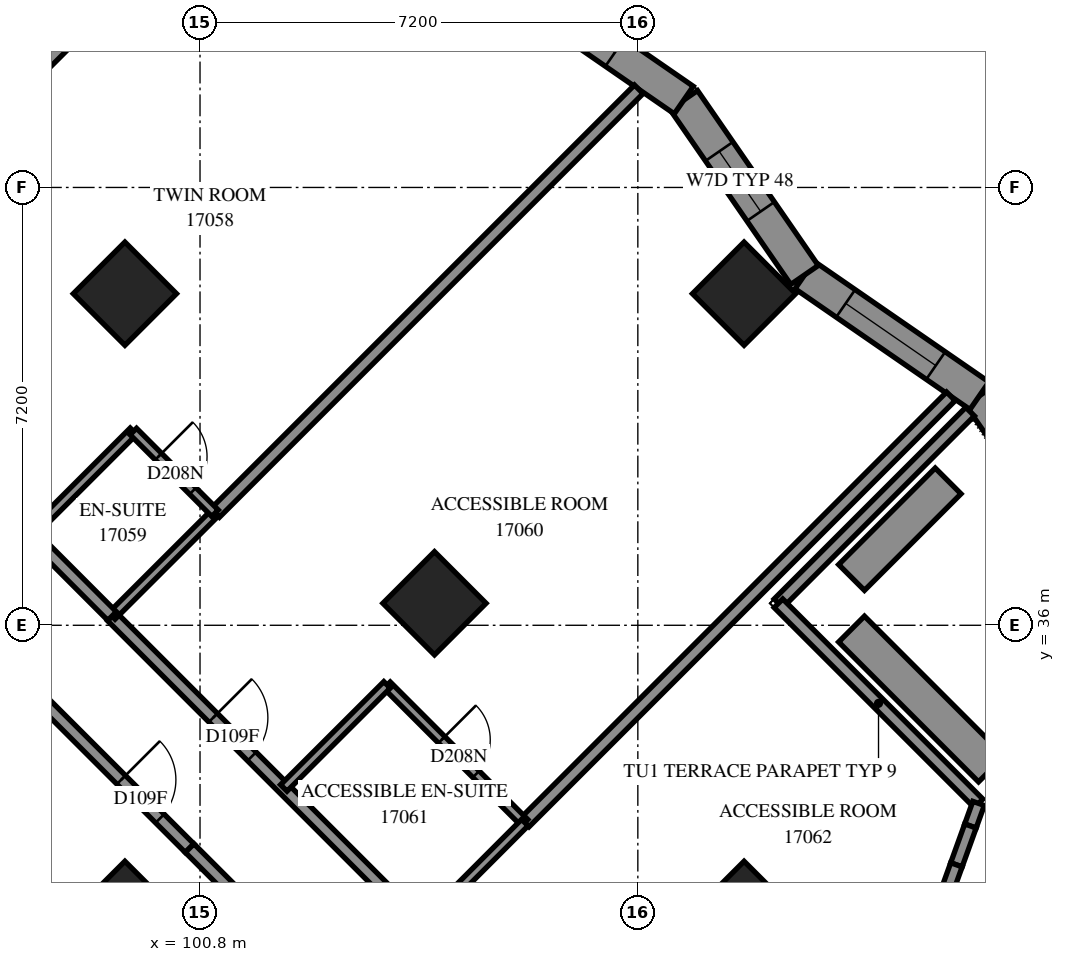
"""IFC4 building model, lengths in metres.
Left out: names, types, materials, properties, quantities, classifications, styles, units other than length and angle.
Written with IfcOpenShell. Run it as: python <this file> out.ifc"""

import sys

from ifc_helpers import new_model, si_unit, direction, frame, frame_2d, origin, origin_2d, place, context, subcontext, project, spatial, polyline, rectangle, outline, extrude, element, fill, save


model = new_model("IFC4")
c1 = context("Model", 3, precision=1e-05, world=origin(), true_north=direction((0.0, 1.0)))
c2 = subcontext(c1, "Body", "Model", "MODEL_VIEW")
j1 = project(units=[si_unit("LENGTHUNIT", "METRE"), si_unit("PLANEANGLEUNIT", "RADIAN")], contexts=[c1])
p1 = place(None, origin())
s1 = spatial("IfcSite", under=j1, at=p1, CompositionType="ELEMENT")
p2 = place(p1, origin())
s2 = spatial("IfcBuilding", under=s1, at=p2, CompositionType="ELEMENT")
p3 = place(p2, frame((0.0, 0.0, 64.4)))
s3 = spatial("IfcBuildingStorey", under=s2, at=p3, CompositionType="ELEMENT", Elevation=64.4)
for number, where, z_axis, x_axis in (
    (1, (99.565, 41.453, 0.0), (0.0, 0.0, 1.0), (0.707, -0.707, 0.0)),
    (2, (109.747, 41.453, 0.0), (0.0, 0.0, 1.0), (0.707, -0.707, 0.0)),
    (3, (104.656, 36.362, 0.0), (0.0, 0.0, 1.0), (0.707, -0.707, 0.0)),
    (4, (99.565, 31.271, 0.0), (0.0, 0.0, 1.0), (0.707, -0.707, 0.0)),
    (5, (109.747, 31.271, 0.0), (0.0, 0.0, 1.0), (0.707, -0.707, 0.0)),
):
    element("IfcColumn", number, at=place(p3, frame(where, z_axis=z_axis, x_axis=x_axis)), inside=s3, PredefinedType="COLUMN", context=c2, shape_type="SweptSolid", body=[
        extrude(rectangle(XDim=1.2, YDim=1.2, at=origin_2d()), origin(), (0.0, 0.0, 1.0), 3.1),
    ])
p4 = place(p3, frame((115.617, 36.879, 0.0), z_axis=(0.0, 0.0, 1.0), x_axis=(-0.5680848714, 0.8229699745, 0.0)))
e6 = element("IfcWall", 6, at=p4, inside=s3, PredefinedType="SOLIDWALL", context=c2, shape_type="SweptSolid", body=[
    extrude(outline(polyline([(0.074, -0.275), (3.569, -0.275), (3.469, 0.275), (-0.074, 0.275), (0.074, -0.275)])), origin(), (0.0, 0.0, 1.0), 3.1),
])
p5 = place(p4, frame((0.834, 0.0, 0.7)))
e7 = element("IfcOpeningElement", 7, at=p5, cuts=e6, PredefinedType="OPENING", context=c2, shape_type="SweptSolid", body=[
    extrude(rectangle(XDim=1.8, YDim=2.0, at=frame_2d((0.9, 1.0))), frame((0.0, 0.285, 0.0), z_axis=(0.0, -1.0, 0.0), x_axis=(1.0, 0.0, 0.0)), (0.0, 0.0, 1.0), 0.57),
])
p6 = place(p3, frame((113.618, 39.775, 0.0), z_axis=(0.0, 0.0, 1.0), x_axis=(-0.8229761943, 0.5680758609, 0.0)))
e8 = element("IfcWall", 8, at=p6, inside=s3, PredefinedType="SOLIDWALL", context=c2, shape_type="SweptSolid", body=[
    extrude(outline(polyline([(-0.05, -0.275), (3.445, -0.275), (3.546, 0.275), (0.05, 0.275), (-0.05, -0.275)])), origin(), (0.0, 0.0, 1.0), 3.1),
])
p7 = place(p6, frame((0.873, 0.0, 0.7)))
e9 = element("IfcOpeningElement", 9, at=p7, cuts=e8, PredefinedType="OPENING", context=c2, shape_type="SweptSolid", body=[
    extrude(rectangle(XDim=1.8, YDim=2.0, at=frame_2d((0.9, 1.0))), frame((0.0, 0.285, 0.0), z_axis=(0.0, -1.0, 0.0), x_axis=(1.0, 0.0, 0.0)), (0.0, 0.0, 1.0), 0.57),
])
p8 = place(p3, frame((110.741, 41.761, 0.0), z_axis=(0.0, 0.0, 1.0), x_axis=(-0.5680698592, 0.822980337, 0.0)))
e10 = element("IfcWall", 10, at=p8, inside=s3, PredefinedType="SOLIDWALL", context=c2, shape_type="SweptSolid", body=[
    extrude(outline(polyline([(0.05, -0.275), (3.546, -0.275), (3.445, 0.275), (-0.05, 0.275), (0.05, -0.275)])), origin(), (0.0, 0.0, 1.0), 3.1),
])
p9 = place(p8, frame((1.269, 0.0, 0.5)))
e11 = element("IfcOpeningElement", 11, at=p9, cuts=e10, PredefinedType="OPENING", context=c2, shape_type="SweptSolid", body=[
    extrude(rectangle(XDim=1.2, YDim=2.45, at=frame_2d((0.6, 1.225))), frame((0.0, 0.285, 0.0), z_axis=(0.0, -1.0, 0.0), x_axis=(1.0, 0.0, 0.0)), (0.0, 0.0, 1.0), 0.57),
])
p10 = place(p3, frame((108.755, 44.637, 0.0), z_axis=(0.0, 0.0, 1.0), x_axis=(-0.8229761943, 0.5680758609, 0.0)))
e12 = element("IfcWall", 12, at=p10, inside=s3, PredefinedType="SOLIDWALL", context=c2, shape_type="SweptSolid", body=[
    extrude(outline(polyline([(-0.05, -0.275), (3.445, -0.275), (3.546, 0.275), (0.05, 0.275), (-0.05, -0.275)])), origin(), (0.0, 0.0, 1.0), 3.1),
])
p11 = place(p10, frame((1.377, 0.0, 0.5)))
e13 = element("IfcOpeningElement", 13, at=p11, cuts=e12, PredefinedType="OPENING", context=c2, shape_type="SweptSolid", body=[
    extrude(rectangle(XDim=1.2, YDim=2.45, at=frame_2d((0.6, 1.225))), frame((0.0, 0.285, 0.0), z_axis=(0.0, -1.0, 0.0), x_axis=(1.0, 0.0, 0.0)), (0.0, 0.0, 1.0), 0.57),
])
p12 = place(p3, frame((113.464, 39.513, 0.0), z_axis=(0.0, 0.0, 1.0), x_axis=(-0.7071067812, -0.7071067812, 0.0)))
e14 = element("IfcWall", 14, at=p12, inside=s3, PredefinedType="PARAPET", context=c2, shape_type="SweptSolid", body=[
    extrude(outline(polyline([(0.0, -0.1), (4.557, -0.1), (4.357, 0.1), (0.0, 0.1), (0.0, -0.1)])), origin(), (0.0, 0.0, 1.0), 0.25),
])
p13 = place(p3, frame((110.313, 36.362, 0.0), z_axis=(0.0, 0.0, 1.0), x_axis=(0.7070960376, -0.7071175246, 0.0)))
e15 = element("IfcWall", 15, at=p13, inside=s3, PredefinedType="PARAPET", context=c2, shape_type="SweptSolid", body=[
    extrude(outline(polyline([(-0.1, -0.1), (4.59, -0.1), (4.718, 0.1), (0.1, 0.1), (-0.1, -0.1)])), origin(), (0.0, 0.0, 1.0), 0.25),
])
p14 = place(p3, frame((113.603, 33.071, 0.0), z_axis=(0.0, 0.0, 1.0), x_axis=(-0.3390781297, -0.9407582165, 0.0)))
e16 = element("IfcWall", 16, at=p14, inside=s3, PredefinedType="PARAPET", context=c2, shape_type="SweptSolid", body=[
    extrude(outline(polyline([(0.064, -0.1), (0.395, -0.1), (0.395, 0.1), (-0.064, 0.1), (0.064, -0.1)])), origin(), (0.0, 0.0, 1.0), 0.25),
])
p15 = place(p3, frame((113.47, 32.699, 0.0), z_axis=(0.0, 0.0, 1.0), x_axis=(-0.339246254, -0.9406976024, 0.0)))
e17 = element("IfcWall", 17, at=p15, inside=s3, PredefinedType="PARAPET", context=c2, shape_type="SweptSolid", body=[
    extrude(outline(polyline([(0.0, -0.1), (0.679, -0.1), (0.679, 0.1), (0.0, 0.1), (0.0, -0.1)])), origin(), (0.0, 0.0, 1.0), 0.25),
])
p16 = place(p3, frame((113.239, 32.061, 0.0), z_axis=(0.0, 0.0, 1.0), x_axis=(-0.3392575143, -0.9406935415, 0.0)))
e18 = element("IfcWall", 18, at=p16, inside=s3, PredefinedType="PARAPET", context=c2, shape_type="SweptSolid", body=[
    extrude(outline(polyline([(0.0, -0.1), (4.185, -0.1), (4.185, 0.1), (0.0, 0.1), (0.0, -0.1)])), origin(), (0.0, 0.0, 1.0), 0.25),
])
p17 = place(p3, frame((111.515, 35.938, 0.0), z_axis=(0.0, 0.0, 1.0), x_axis=(0.7070914108, -0.7071221512, 0.0)))
e19 = element("IfcWall", 19, at=p17, inside=s3, PredefinedType="SOLIDWALL", context=c2, shape_type="SweptSolid", body=[
    extrude(rectangle(XDim=3.253, YDim=0.6, at=frame_2d((1.627, 0.0))), origin(), (0.0, 0.0, 1.0), 0.65),
])
p18 = place(p3, frame((94.259, 41.243, 0.0), z_axis=(0.0, 0.0, 1.0), x_axis=(0.7070206559, 0.7071928959, 0.0)))
e20 = element("IfcWall", 20, at=p18, inside=s3, PredefinedType="PARTITIONING", context=c2, shape_type="SweptSolid", body=[
    extrude(rectangle(XDim=12.192, YDim=0.2, at=frame_2d((6.096, 0.0))), origin(), (0.0, 0.0, 1.0), 3.1),
])
p19 = place(p3, frame((93.484, 42.02, 0.0), z_axis=(0.0, 0.0, 1.0), x_axis=(0.7071067812, 0.7071067812, 0.0)))
e21 = element("IfcWall", 21, at=p19, inside=s3, PredefinedType="PARTITIONING", context=c2, shape_type="SweptSolid", body=[
    extrude(rectangle(XDim=9.998, YDim=0.2, at=frame_2d((4.999, 0.0))), origin(), (0.0, 0.0, 1.0), 3.1),
])
p20 = place(p19, frame((0.148, 0.0, 0.0)))
e22 = element("IfcOpeningElement", 22, at=p20, cuts=e21, PredefinedType="OPENING", context=c2, shape_type="SweptSolid", body=[
    extrude(rectangle(XDim=1.0, YDim=2.1, at=frame_2d((0.5, 1.05))), frame((0.0, 0.11, 0.0), z_axis=(0.0, -1.0, 0.0), x_axis=(1.0, 0.0, 0.0)), (0.0, 0.0, 1.0), 0.22),
])
p21 = place(p3, frame((106.14, 32.756, 0.0), z_axis=(0.0, 0.0, 1.0), x_axis=(0.7071017366, 0.7071118258, 0.0)))
e23 = element("IfcWall", 23, at=p21, inside=s3, PredefinedType="PARTITIONING", context=c2, shape_type="SweptSolid", body=[
    extrude(rectangle(XDim=9.912, YDim=0.2, at=frame_2d((4.956, 0.0))), origin(), (0.0, 0.0, 1.0), 3.1),
])
p22 = place(p3, frame((101.049, 37.847, 0.0), z_axis=(0.0, 0.0, 1.0), x_axis=(0.7071067812, 0.7071067812, 0.0)))
e24 = element("IfcWall", 24, at=p22, inside=s3, PredefinedType="PARTITIONING", context=c2, shape_type="SweptSolid", body=[
    extrude(rectangle(XDim=9.852, YDim=0.2, at=frame_2d((4.926, 0.0))), origin(), (0.0, 0.0, 1.0), 3.1),
])
p23 = place(p3, frame((99.349, 36.147, 0.0), z_axis=(0.0, 0.0, 1.0), x_axis=(0.7071067812, -0.7071067812, 0.0)))
e25 = element("IfcWall", 25, at=p23, inside=s3, PredefinedType="PARTITIONING", context=c2, shape_type="SweptSolid", body=[
    extrude(rectangle(XDim=7.201, YDim=0.2, at=frame_2d((3.601, 0.0))), origin(), (0.0, 0.0, 1.0), 3.1),
])
p24 = place(p23, frame((2.358, 0.0, 0.0)))
e26 = element("IfcOpeningElement", 26, at=p24, cuts=e25, PredefinedType="OPENING", context=c2, shape_type="SweptSolid", body=[
    extrude(rectangle(XDim=0.9, YDim=2.1, at=frame_2d((0.45, 1.05))), frame((0.0, 0.11, 0.0), z_axis=(0.0, -1.0, 0.0), x_axis=(1.0, 0.0, 0.0)), (0.0, 0.0, 1.0), 0.22),
])
p25 = place(p3, frame((98.082, 34.879, 0.0), z_axis=(0.0, 0.0, 1.0), x_axis=(0.7073845681, -0.7068288851, 0.0)))
e27 = element("IfcWall", 27, at=p25, inside=s3, PredefinedType="PARTITIONING", context=c2, shape_type="SweptSolid", body=[
    extrude(rectangle(XDim=3.599, YDim=0.2, at=frame_2d((1.8, 0.0))), origin(), (0.0, 0.0, 1.0), 3.1),
])
p26 = place(p25, frame((2.009, 0.0, 0.0)))
e28 = element("IfcOpeningElement", 28, at=p26, cuts=e27, PredefinedType="OPENING", context=c2, shape_type="SweptSolid", body=[
    extrude(rectangle(XDim=0.9, YDim=2.1, at=frame_2d((0.45, 1.05))), frame((0.0, 0.11, 0.0), z_axis=(0.0, -1.0, 0.0), x_axis=(1.0, 0.0, 0.0)), (0.0, 0.0, 1.0), 0.22),
])
p27 = place(p3, frame((103.875, 35.015, 0.0), z_axis=(0.0, 0.0, 1.0), x_axis=(0.7071067812, -0.7071067812, 0.0)))
e29 = element("IfcWall", 29, at=p27, inside=s3, PredefinedType="PARTITIONING", context=c2, shape_type="SweptSolid", body=[
    extrude(rectangle(XDim=3.199, YDim=0.15, at=frame_2d((1.599, 0.0))), origin(), (0.0, 0.0, 1.0), 3.1),
])
p28 = place(p27, frame((1.27, 0.0, 0.0)))
e30 = element("IfcOpeningElement", 30, at=p28, cuts=e29, PredefinedType="OPENING", context=c2, shape_type="SweptSolid", body=[
    extrude(rectangle(XDim=0.8, YDim=2.1, at=frame_2d((0.4, 1.05))), frame((0.0, 0.085, 0.0), z_axis=(0.0, -1.0, 0.0), x_axis=(1.0, 0.0, 0.0)), (0.0, 0.0, 1.0), 0.17),
])
for number, where, z_axis, x_axis in (
    (31, (99.349, 36.153, 0.0), (0.0, 0.0, 1.0), (0.708, 0.707, 0.0)),
    (32, (104.445, 31.057, 0.0), (0.0, 0.0, 1.0), (0.707, 0.708, 0.0)),
    (33, (102.177, 33.325, 0.0), (0.0, 0.0, 1.0), (0.708, 0.707, 0.0)),
):
    element("IfcWall", number, at=place(p3, frame(where, z_axis=z_axis, x_axis=x_axis)), inside=s3, PredefinedType="PARTITIONING", context=c2, shape_type="SweptSolid", body=[
        extrude(rectangle(XDim=2.4, YDim=0.15, at=frame_2d((1.2, 0.0))), origin(), (0.0, 0.0, 1.0), 3.1),
    ])
p29 = place(p3, frame((98.009, 37.495, 0.0), z_axis=(0.0, 0.0, 1.0), x_axis=(0.7071067812, 0.7071067812, 0.0)))
e34 = element("IfcWall", 34, at=p29, inside=s3, PredefinedType="PARTITIONING", context=c2, shape_type="SweptSolid", body=[
    extrude(rectangle(XDim=2.398, YDim=0.15, at=frame_2d((1.199, 0.0))), origin(), (0.0, 0.0, 1.0), 3.1),
])
p30 = place(p3, frame((99.703, 39.187, 0.0), z_axis=(0.0, 0.0, 1.0), x_axis=(0.7071067812, -0.7071067812, 0.0)))
e35 = element("IfcWall", 35, at=p30, inside=s3, PredefinedType="PARTITIONING", context=c2, shape_type="SweptSolid", body=[
    extrude(rectangle(XDim=1.901, YDim=0.15, at=frame_2d((0.95, 0.0))), origin(), (0.0, 0.0, 1.0), 3.1),
])
p31 = place(p30, frame((0.584, 0.0, 0.0)))
e36 = element("IfcOpeningElement", 36, at=p31, cuts=e35, PredefinedType="OPENING", context=c2, shape_type="SweptSolid", body=[
    extrude(rectangle(XDim=0.8, YDim=2.1, at=frame_2d((0.4, 1.05))), frame((0.0, 0.085, 0.0), z_axis=(0.0, -1.0, 0.0), x_axis=(1.0, 0.0, 0.0)), (0.0, 0.0, 1.0), 0.17),
])
p32 = place(p3, frame((98.012, 37.496, 0.0), z_axis=(0.0, 0.0, 1.0), x_axis=(0.7065800724, -0.7076330979, 0.0)))
e37 = element("IfcWall", 37, at=p32, inside=s3, PredefinedType="PARTITIONING", context=c2, shape_type="SweptSolid", body=[
    extrude(rectangle(XDim=1.899, YDim=0.2, at=frame_2d((0.95, 0.0))), origin(), (0.0, 0.0, 1.0), 3.1),
])
p33 = place(p3, frame((100.629, 32.335, 0.0), z_axis=(0.0, 0.0, 1.0), x_axis=(0.7071067812, -0.7071067812, 0.0)))
e38 = element("IfcWall", 38, at=p33, inside=s3, PredefinedType="PARTITIONING", context=c2, shape_type="SweptSolid", body=[
    extrude(rectangle(XDim=1.7, YDim=0.2, at=frame_2d((0.85, 0.0))), origin(), (0.0, 0.0, 1.0), 3.1),
])
p34 = place(p3, frame((113.103, 38.374, 0.0), z_axis=(0.0, 0.0, 1.0), x_axis=(-0.7071290498, -0.7070845119, 0.0)))
e39 = element("IfcWall", 39, at=p34, inside=s3, PredefinedType="SOLIDWALL", context=c2, shape_type="SweptSolid", body=[
    extrude(outline(polyline([(0.0, -0.3), (2.245, -0.3), (2.245, 0.3), (0.0, 0.3), (0.0, -0.3)])), origin(), (0.0, 0.0, 1.0), 0.65),
])
p35 = place(p7, origin())
e40 = element("IfcWindow", 40, at=p35, inside=s3, PartitioningType="SINGLE_PANEL", PredefinedType="WINDOW", context=c2, shape_type="SweptSolid", body=[
    extrude(rectangle(XDim=1.8, YDim=2.0, at=frame_2d((0.9, 1.0))), frame((0.0, 0.155, 0.0), z_axis=(0.0, -1.0, 0.0), x_axis=(1.0, 0.0, 0.0)), (0.0, 0.0, 1.0), 0.06),
])
fill(e9, e40)
p36 = place(p9, origin())
e41 = element("IfcWindow", 41, at=p36, inside=s3, PartitioningType="SINGLE_PANEL", PredefinedType="WINDOW", context=c2, shape_type="SweptSolid", body=[
    extrude(rectangle(XDim=1.2, YDim=2.45, at=frame_2d((0.6, 1.225))), frame((0.0, 0.155, 0.0), z_axis=(0.0, -1.0, 0.0), x_axis=(1.0, 0.0, 0.0)), (0.0, 0.0, 1.0), 0.06),
])
fill(e11, e41)
p37 = place(p11, origin())
e42 = element("IfcWindow", 42, at=p37, inside=s3, PartitioningType="SINGLE_PANEL", PredefinedType="WINDOW", context=c2, shape_type="SweptSolid", body=[
    extrude(rectangle(XDim=1.2, YDim=2.45, at=frame_2d((0.6, 1.225))), frame((0.0, 0.155, 0.0), z_axis=(0.0, -1.0, 0.0), x_axis=(1.0, 0.0, 0.0)), (0.0, 0.0, 1.0), 0.06),
])
fill(e13, e42)
p38 = place(p31, origin())
e43 = element("IfcDoor", 43, at=p38, inside=s3, OperationType="SINGLE_SWING_RIGHT", PredefinedType="DOOR", context=c2, shape_type="SweptSolid", body=[
    extrude(rectangle(XDim=0.8, YDim=2.1, at=frame_2d((0.4, 1.05))), frame((0.0, 0.025, 0.0), z_axis=(0.0, -1.0, 0.0), x_axis=(1.0, 0.0, 0.0)), (0.0, 0.0, 1.0), 0.05),
])
fill(e36, e43)
p39 = place(p24, origin())
e44 = element("IfcDoor", 44, at=p39, inside=s3, OperationType="SINGLE_SWING_RIGHT", PredefinedType="DOOR", context=c2, shape_type="SweptSolid", body=[
    extrude(rectangle(XDim=0.9, YDim=2.1, at=frame_2d((0.45, 1.05))), frame((0.0, 0.025, 0.0), z_axis=(0.0, -1.0, 0.0), x_axis=(1.0, 0.0, 0.0)), (0.0, 0.0, 1.0), 0.05),
])
fill(e26, e44)
p40 = place(p28, origin())
e45 = element("IfcDoor", 45, at=p40, inside=s3, OperationType="SINGLE_SWING_RIGHT", PredefinedType="DOOR", context=c2, shape_type="SweptSolid", body=[
    extrude(rectangle(XDim=0.8, YDim=2.1, at=frame_2d((0.4, 1.05))), frame((0.0, 0.025, 0.0), z_axis=(0.0, -1.0, 0.0), x_axis=(1.0, 0.0, 0.0)), (0.0, 0.0, 1.0), 0.05),
])
fill(e30, e45)
p41 = place(p26, origin())
e46 = element("IfcDoor", 46, at=p41, inside=s3, OperationType="SINGLE_SWING_LEFT", PredefinedType="DOOR", context=c2, shape_type="SweptSolid", body=[
    extrude(rectangle(XDim=0.9, YDim=2.1, at=frame_2d((0.45, 1.05))), frame((0.0, 0.025, 0.0), z_axis=(0.0, -1.0, 0.0), x_axis=(1.0, 0.0, 0.0)), (0.0, 0.0, 1.0), 0.05),
])
fill(e28, e46)
save(model, sys.argv[1])
